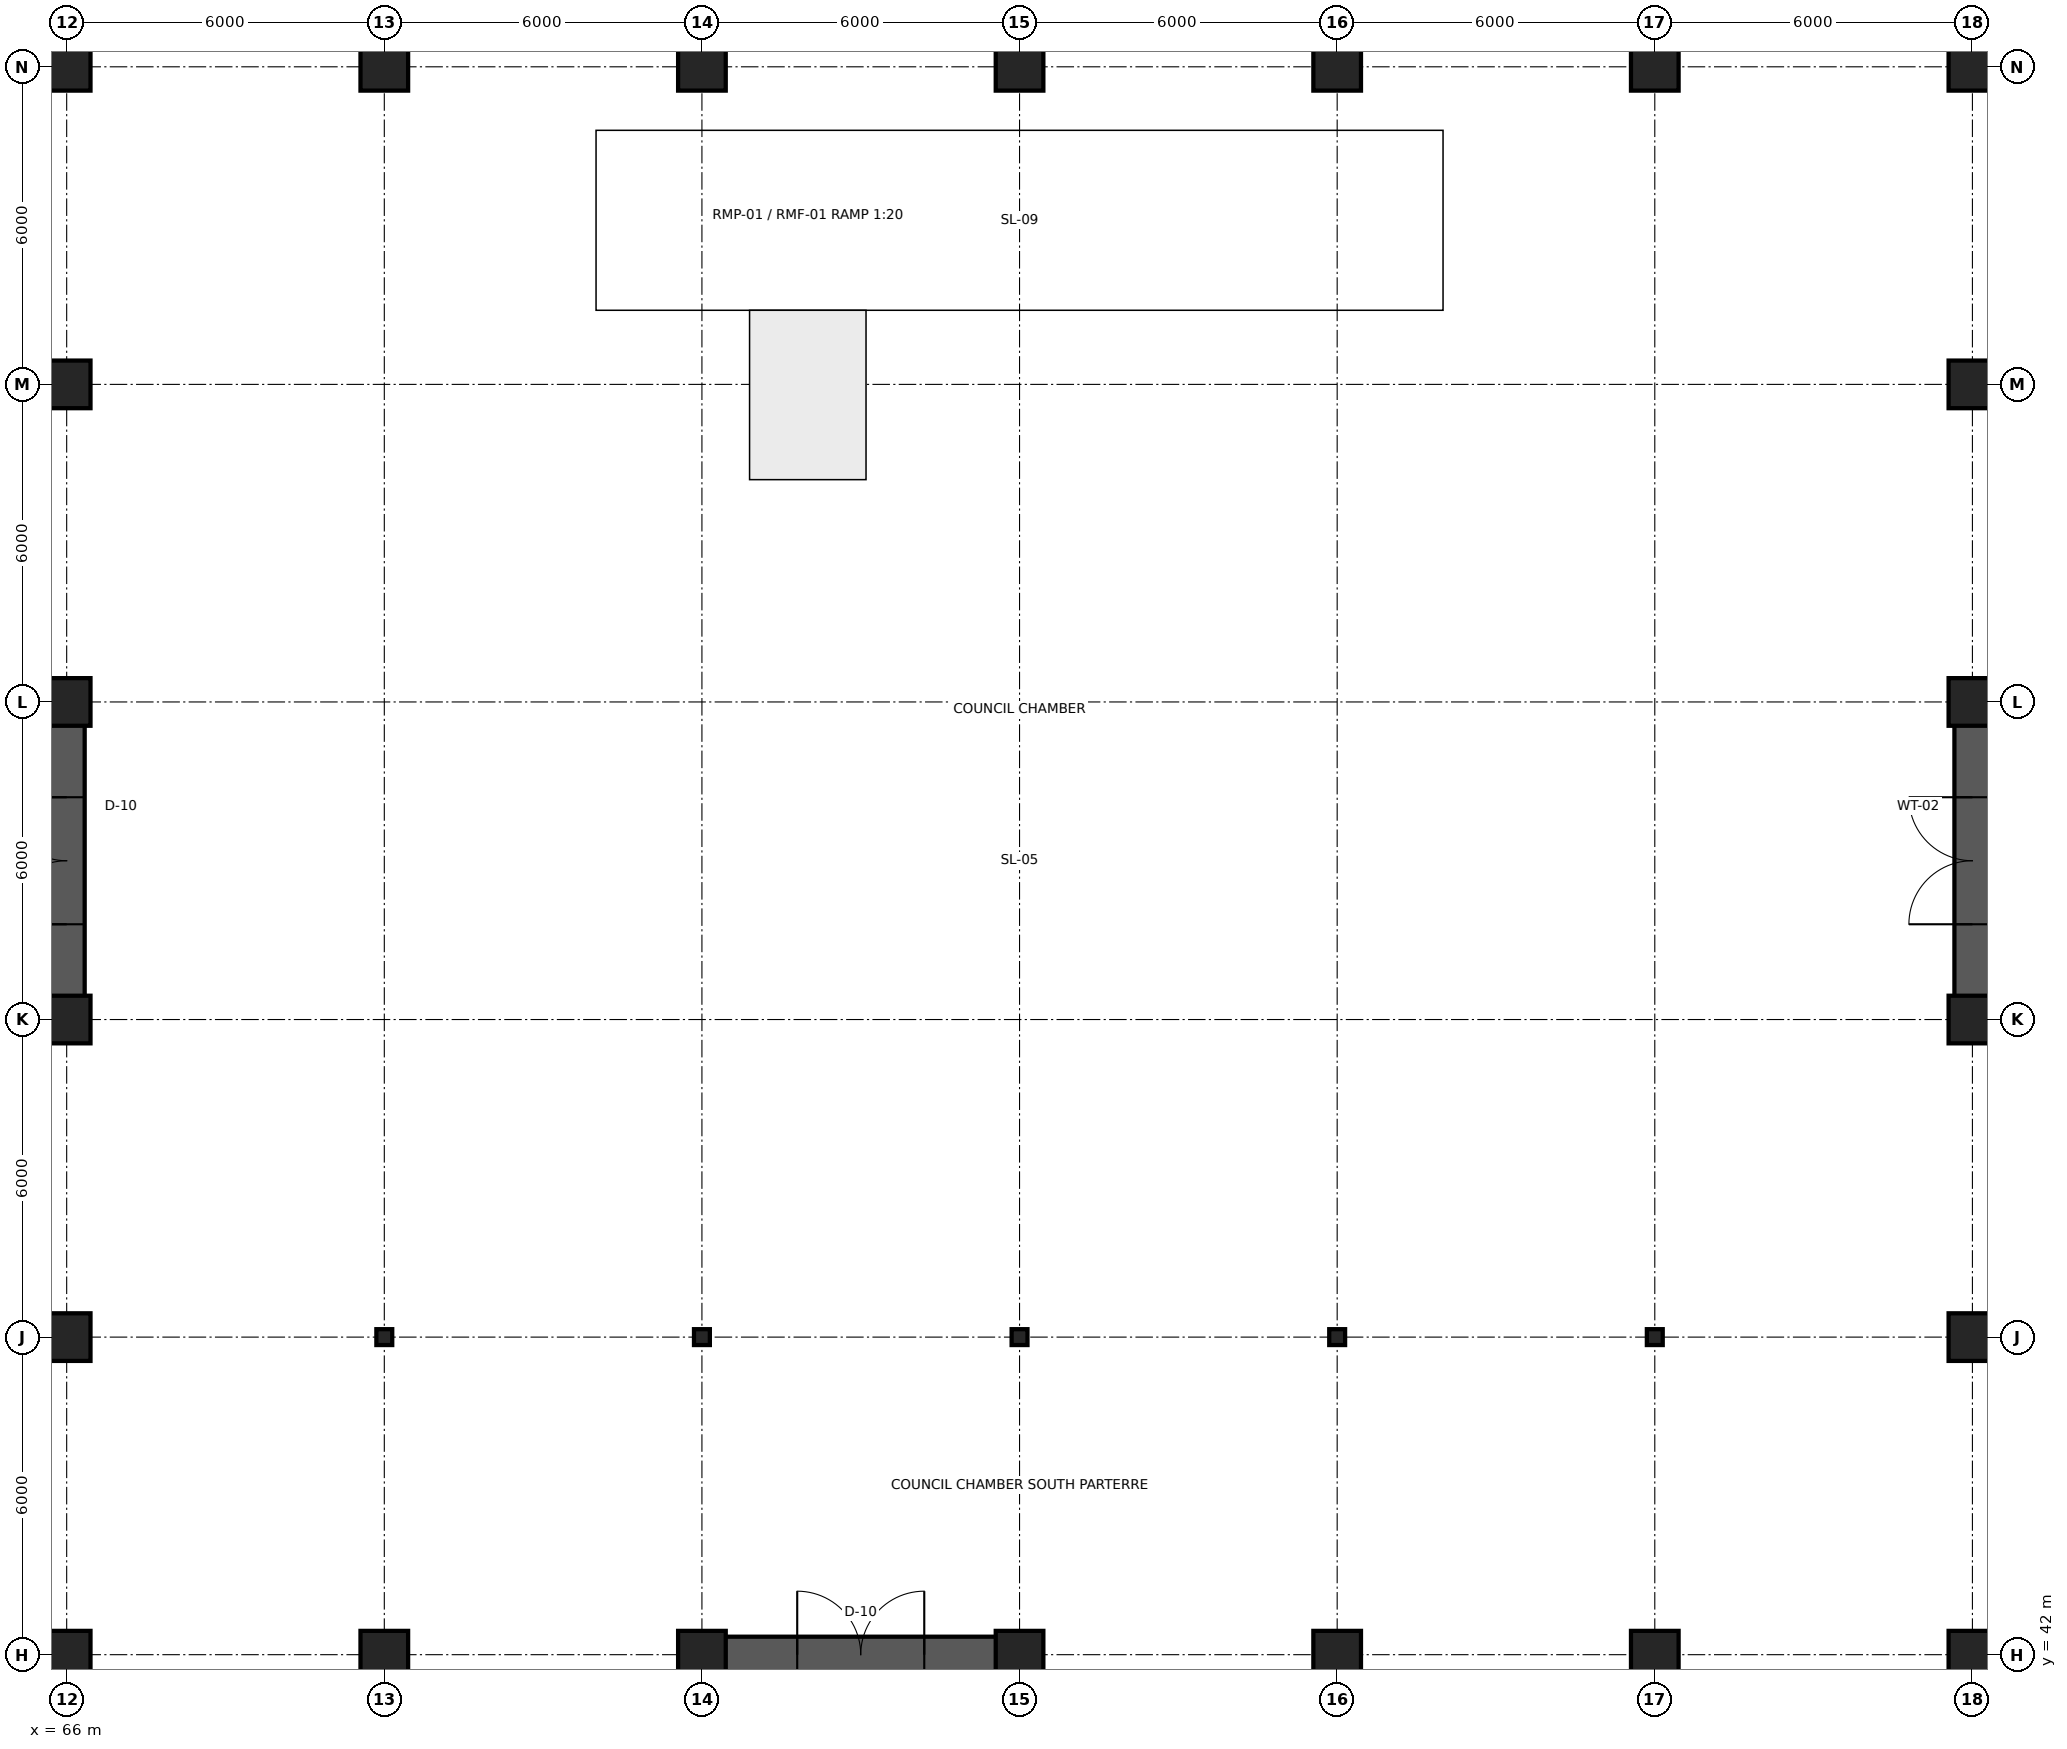
"""IFC4 building model, lengths in metres.
Left out: names, types, materials, properties, quantities, classifications, styles, units other than length and angle.
Written with IfcOpenShell. Run it as: python <this file> out.ifc"""

import sys

from ifc_helpers import new_model, si_unit, direction, frame, frame_2d, origin, origin_2d, place, context, subcontext, project, spatial, rectangle, i_section, extrude, element, fill, save


model = new_model("IFC4")
c1 = context("Model", 3, precision=1e-05, world=origin(), true_north=direction((0.0, 1.0)))
c2 = subcontext(c1, "Body", "Model", "MODEL_VIEW")
j1 = project(units=[si_unit("LENGTHUNIT", "METRE"), si_unit("PLANEANGLEUNIT", "RADIAN")], contexts=[c1])
p1 = place(None, origin())
s1 = spatial("IfcSite", under=j1, at=p1, CompositionType="ELEMENT")
p2 = place(p1, origin())
s2 = spatial("IfcBuilding", under=s1, at=p2, CompositionType="ELEMENT")
p3 = place(p2, frame((0.0, 0.0, 6.0)))
s3 = spatial("IfcBuildingStorey", under=s2, at=p3, CompositionType="ELEMENT", Elevation=6.0)
for number, where, z_axis, x_axis in (
    (1, (66.0, 42.0, 0.0), (0.0, 0.0, 1.0), (1.0, 0.0, 0.0)),
    (2, (72.0, 42.0, 0.0), (0.0, 0.0, 1.0), (1.0, 0.0, 0.0)),
    (3, (78.0, 42.0, 0.0), (0.0, 0.0, 1.0), (1.0, 0.0, 0.0)),
    (4, (84.0, 42.0, 0.0), (0.0, 0.0, 1.0), (1.0, 0.0, 0.0)),
    (5, (90.0, 42.0, 0.0), (0.0, 0.0, 1.0), (1.0, 0.0, 0.0)),
    (6, (96.0, 42.0, 0.0), (0.0, 0.0, 1.0), (1.0, 0.0, 0.0)),
    (7, (102.0, 42.0, 0.0), (0.0, 0.0, 1.0), (1.0, 0.0, 0.0)),
    (8, (66.0, 48.0, 0.0), (0.0, 0.0, 1.0), (1.0, 0.0, 0.0)),
):
    element("IfcColumn", number, at=place(p3, frame(where, z_axis=z_axis, x_axis=x_axis)), inside=s3, PredefinedType="COLUMN", context=c2, shape_type="SweptSolid", body=[
        extrude(rectangle(XDim=0.9, YDim=0.9, at=origin_2d()), origin(), (0.0, 0.0, 1.0), 6.0),
    ])
for number, where, z_axis, x_axis in (
    (9, (72.0, 48.0, 0.0), (0.0, 0.0, 1.0), (1.0, 0.0, 0.0)),
    (10, (78.0, 48.0, 0.0), (0.0, 0.0, 1.0), (1.0, 0.0, 0.0)),
    (11, (84.0, 48.0, 0.0), (0.0, 0.0, 1.0), (1.0, 0.0, 0.0)),
    (12, (90.0, 48.0, 0.0), (0.0, 0.0, 1.0), (1.0, 0.0, 0.0)),
    (13, (96.0, 48.0, 0.0), (0.0, 0.0, 1.0), (1.0, 0.0, 0.0)),
):
    element("IfcColumn", number, at=place(p3, frame(where, z_axis=z_axis, x_axis=x_axis)), inside=s3, PredefinedType="COLUMN", context=c2, shape_type="SweptSolid", body=[
        extrude(i_section(OverallWidth=0.3, OverallDepth=0.3, WebThickness=0.01, FlangeThickness=0.015, FilletRadius=0.018, at=origin_2d()), origin(), (0.0, 0.0, 1.0), 5.76),
    ])
for number, where, z_axis, x_axis in (
    (14, (102.0, 48.0, 0.0), (0.0, 0.0, 1.0), (1.0, 0.0, 0.0)),
    (15, (66.0, 54.0, 0.0), (0.0, 0.0, 1.0), (1.0, 0.0, 0.0)),
    (16, (102.0, 54.0, 0.0), (0.0, 0.0, 1.0), (1.0, 0.0, 0.0)),
    (17, (66.0, 60.0, 0.0), (0.0, 0.0, 1.0), (1.0, 0.0, 0.0)),
    (18, (102.0, 60.0, 0.0), (0.0, 0.0, 1.0), (1.0, 0.0, 0.0)),
    (19, (66.0, 66.0, 0.0), (0.0, 0.0, 1.0), (1.0, 0.0, 0.0)),
    (20, (102.0, 66.0, 0.0), (0.0, 0.0, 1.0), (1.0, 0.0, 0.0)),
    (21, (66.0, 72.0, 0.0), (0.0, 0.0, 1.0), (1.0, 0.0, 0.0)),
    (22, (72.0, 72.0, 0.0), (0.0, 0.0, 1.0), (1.0, 0.0, 0.0)),
    (23, (78.0, 72.0, 0.0), (0.0, 0.0, 1.0), (1.0, 0.0, 0.0)),
    (24, (84.0, 72.0, 0.0), (0.0, 0.0, 1.0), (1.0, 0.0, 0.0)),
    (25, (90.0, 72.0, 0.0), (0.0, 0.0, 1.0), (1.0, 0.0, 0.0)),
    (26, (96.0, 72.0, 0.0), (0.0, 0.0, 1.0), (1.0, 0.0, 0.0)),
    (27, (102.0, 72.0, 0.0), (0.0, 0.0, 1.0), (1.0, 0.0, 0.0)),
):
    element("IfcColumn", number, at=place(p3, frame(where, z_axis=z_axis, x_axis=x_axis)), inside=s3, PredefinedType="COLUMN", context=c2, shape_type="SweptSolid", body=[
        extrude(rectangle(XDim=0.9, YDim=0.9, at=origin_2d()), origin(), (0.0, 0.0, 1.0), 6.0),
    ])
p4 = place(p3, frame((78.0, 42.0, 0.0), z_axis=(0.0, 0.0, 1.0), x_axis=(1.0, 0.0, 0.0)))
e28 = element("IfcWall", 28, at=p4, inside=s3, PredefinedType="SOLIDWALL", context=c2, shape_type="SweptSolid", body=[
    extrude(rectangle(XDim=6.0, YDim=0.68, at=frame_2d((3.0, 0.0))), origin(), (0.0, 0.0, 1.0), 5.76),
])
p5 = place(p4, frame((1.8, 0.0, 0.0)))
e29 = element("IfcOpeningElement", 29, at=p5, cuts=e28, PredefinedType="OPENING", context=c2, shape_type="SweptSolid", body=[
    extrude(rectangle(XDim=2.4, YDim=3.2, at=frame_2d((1.2, 1.6))), frame((0.0, 0.355, 0.0), z_axis=(0.0, -1.0, 0.0), x_axis=(1.0, 0.0, 0.0)), (0.0, 0.0, 1.0), 0.71),
])
p6 = place(p3, frame((66.0, 54.0, 0.0), z_axis=(0.0, 0.0, 1.0), x_axis=(0.0, 1.0, 0.0)))
e30 = element("IfcWall", 30, at=p6, inside=s3, PredefinedType="SOLIDWALL", context=c2, shape_type="SweptSolid", body=[
    extrude(rectangle(XDim=6.0, YDim=0.68, at=frame_2d((3.0, 0.0))), origin(), (0.0, 0.0, 1.0), 5.76),
])
p7 = place(p6, frame((1.8, 0.0, 0.0)))
e31 = element("IfcOpeningElement", 31, at=p7, cuts=e30, PredefinedType="OPENING", context=c2, shape_type="SweptSolid", body=[
    extrude(rectangle(XDim=2.4, YDim=3.2, at=frame_2d((1.2, 1.6))), frame((0.0, 0.355, 0.0), z_axis=(0.0, -1.0, 0.0), x_axis=(1.0, 0.0, 0.0)), (0.0, 0.0, 1.0), 0.71),
])
p8 = place(p3, frame((102.0, 54.0, 0.0), z_axis=(0.0, 0.0, 1.0), x_axis=(0.0, 1.0, 0.0)))
e32 = element("IfcWall", 32, at=p8, inside=s3, PredefinedType="SOLIDWALL", context=c2, shape_type="SweptSolid", body=[
    extrude(rectangle(XDim=6.0, YDim=0.68, at=frame_2d((3.0, 0.0))), origin(), (0.0, 0.0, 1.0), 5.76),
])
p9 = place(p8, frame((1.8, 0.0, 0.0)))
e33 = element("IfcOpeningElement", 33, at=p9, cuts=e32, PredefinedType="OPENING", context=c2, shape_type="SweptSolid", body=[
    extrude(rectangle(XDim=2.4, YDim=3.2, at=frame_2d((1.2, 1.6))), frame((0.0, 0.355, 0.0), z_axis=(0.0, -1.0, 0.0), x_axis=(1.0, 0.0, 0.0)), (0.0, 0.0, 1.0), 0.71),
])
p10 = place(p5, origin())
e34 = element("IfcDoor", 34, at=p10, inside=s3, OperationType="DOUBLE_DOOR_SINGLE_SWING", PredefinedType="DOOR", context=c2, shape_type="SweptSolid", body=[
    extrude(rectangle(XDim=2.4, YDim=3.2, at=frame_2d((1.2, 1.6))), frame((0.0, 0.025, 0.0), z_axis=(0.0, -1.0, 0.0), x_axis=(1.0, 0.0, 0.0)), (0.0, 0.0, 1.0), 0.05),
])
fill(e29, e34)
p11 = place(p7, origin())
e35 = element("IfcDoor", 35, at=p11, inside=s3, OperationType="DOUBLE_DOOR_SINGLE_SWING", PredefinedType="DOOR", context=c2, shape_type="SweptSolid", body=[
    extrude(rectangle(XDim=2.4, YDim=3.2, at=frame_2d((1.2, 1.6))), frame((0.0, 0.025, 0.0), z_axis=(0.0, -1.0, 0.0), x_axis=(1.0, 0.0, 0.0)), (0.0, 0.0, 1.0), 0.05),
])
fill(e31, e35)
p12 = place(p9, origin())
e36 = element("IfcDoor", 36, at=p12, inside=s3, OperationType="DOUBLE_DOOR_SINGLE_SWING", PredefinedType="DOOR", context=c2, shape_type="SweptSolid", body=[
    extrude(rectangle(XDim=2.4, YDim=3.2, at=frame_2d((1.2, 1.6))), frame((0.0, 0.025, 0.0), z_axis=(0.0, -1.0, 0.0), x_axis=(1.0, 0.0, 0.0)), (0.0, 0.0, 1.0), 0.05),
])
fill(e33, e36)
save(model, sys.argv[1])
